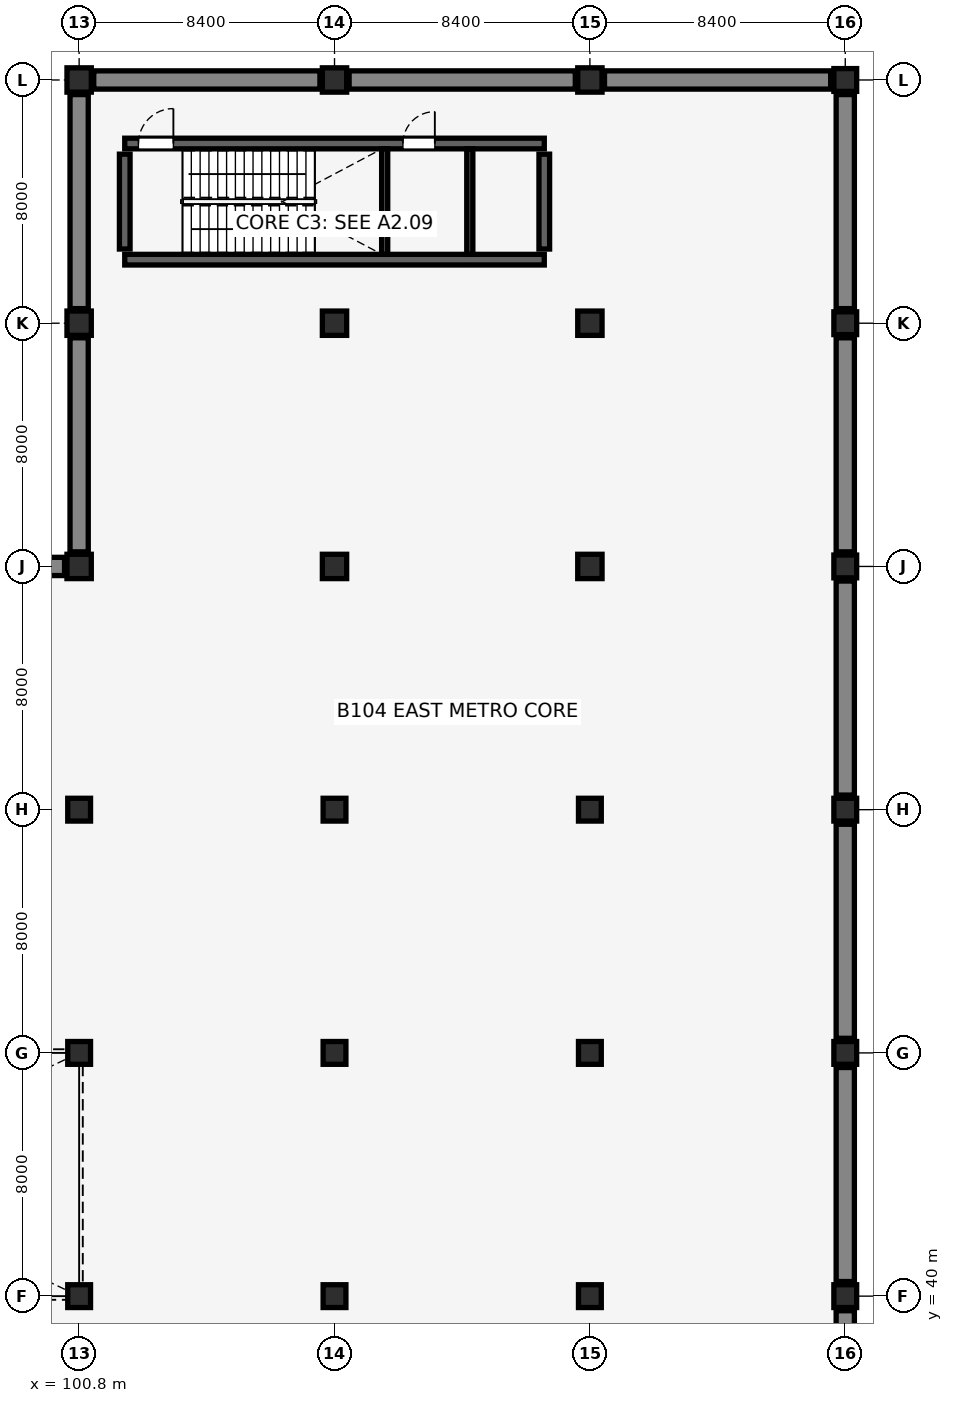
"""IFC4 building model, lengths in metres.
Left out: names, types, materials, properties, quantities, classifications, styles, units other than length and angle.
Written with IfcOpenShell. Run it as: python <this file> out.ifc"""

import sys

from ifc_helpers import new_model, si_unit, direction, frame, frame_2d, origin, origin_2d, place, context, subcontext, project, spatial, rectangle, extrude, element, fill, save


model = new_model("IFC4")
c1 = context("Model", 3, precision=1e-05, world=origin(), true_north=direction((0.0, 1.0)))
c2 = subcontext(c1, "Body", "Model", "MODEL_VIEW")
j1 = project(units=[si_unit("LENGTHUNIT", "METRE"), si_unit("PLANEANGLEUNIT", "RADIAN")], contexts=[c1])
p1 = place(None, origin())
s1 = spatial("IfcSite", under=j1, at=p1, CompositionType="ELEMENT")
p2 = place(p1, origin())
s2 = spatial("IfcBuilding", under=s1, at=p2, CompositionType="ELEMENT")
p3 = place(p2, frame((0.0, 0.0, -5.44)))
s3 = spatial("IfcBuildingStorey", under=s2, at=p3, CompositionType="ELEMENT", Elevation=-5.44)
p4 = place(p3, frame((92.88, 64.0, 0.0), z_axis=(0.0, 0.0, 1.0), x_axis=(1.0, 0.0, 0.0)))
e1 = element("IfcWall", 1, at=p4, inside=s3, PredefinedType="SOLIDWALL", context=c2, shape_type="SweptSolid", body=[
    extrude(rectangle(XDim=7.44, YDim=0.6, at=frame_2d((3.72, 0.0))), origin(), (0.0, 0.0, 1.0), 5.02),
])
for number, where, z_axis, x_axis in (
    (2, (100.8, 64.48, 0.0), (0.0, 0.0, 1.0), (0.0, 1.0, 0.0)),
    (3, (100.8, 72.48, 0.0), (0.0, 0.0, 1.0), (0.0, 1.0, 0.0)),
):
    element("IfcWall", number, at=place(p3, frame(where, z_axis=z_axis, x_axis=x_axis)), inside=s3, PredefinedType="SOLIDWALL", context=c2, shape_type="SweptSolid", body=[
        extrude(rectangle(XDim=7.04, YDim=0.6, at=frame_2d((3.52, 0.0))), origin(), (0.0, 0.0, 1.0), 5.02),
    ])
p5 = place(p3, frame((101.28, 80.0, 0.0), z_axis=(0.0, 0.0, 1.0), x_axis=(1.0, 0.0, 0.0)))
e4 = element("IfcWall", 4, at=p5, inside=s3, PredefinedType="SOLIDWALL", context=c2, shape_type="SweptSolid", body=[
    extrude(rectangle(XDim=7.44, YDim=0.6, at=frame_2d((3.72, 0.0))), origin(), (0.0, 0.0, 1.0), 5.02),
])
p6 = place(p3, frame((109.68, 80.0, 0.0), z_axis=(0.0, 0.0, 1.0), x_axis=(1.0, 0.0, 0.0)))
e5 = element("IfcWall", 5, at=p6, inside=s3, PredefinedType="SOLIDWALL", context=c2, shape_type="SweptSolid", body=[
    extrude(rectangle(XDim=7.44, YDim=0.6, at=frame_2d((3.72, 0.0))), origin(), (0.0, 0.0, 1.0), 5.02),
])
p7 = place(p3, frame((118.08, 80.0, 0.0), z_axis=(0.0, 0.0, 1.0), x_axis=(1.0, 0.0, 0.0)))
e6 = element("IfcWall", 6, at=p7, inside=s3, PredefinedType="SOLIDWALL", context=c2, shape_type="SweptSolid", body=[
    extrude(rectangle(XDim=7.44, YDim=0.6, at=frame_2d((3.72, 0.0))), origin(), (0.0, 0.0, 1.0), 5.02),
])
for number, where, z_axis, x_axis in (
    (7, (126.0, 64.48, 0.0), (0.0, 0.0, 1.0), (0.0, 1.0, 0.0)),
    (8, (126.0, 72.48, 0.0), (0.0, 0.0, 1.0), (0.0, 1.0, 0.0)),
    (9, (126.0, 32.48, 0.0), (0.0, 0.0, 1.0), (0.0, 1.0, 0.0)),
    (10, (126.0, 40.48, 0.0), (0.0, 0.0, 1.0), (0.0, 1.0, 0.0)),
    (11, (126.0, 48.48, 0.0), (0.0, 0.0, 1.0), (0.0, 1.0, 0.0)),
    (12, (126.0, 56.48, 0.0), (0.0, 0.0, 1.0), (0.0, 1.0, 0.0)),
):
    element("IfcWall", number, at=place(p3, frame(where, z_axis=z_axis, x_axis=x_axis)), inside=s3, PredefinedType="SOLIDWALL", context=c2, shape_type="SweptSolid", body=[
        extrude(rectangle(XDim=7.04, YDim=0.6, at=frame_2d((3.52, 0.0))), origin(), (0.0, 0.0, 1.0), 5.02),
    ])
p8 = place(p3, frame((102.3, 74.09, 0.0), z_axis=(0.0, 0.0, 1.0), x_axis=(1.0, 0.0, 0.0)))
e13 = element("IfcWall", 13, at=p8, inside=s3, PredefinedType="SHEAR", context=c2, shape_type="SweptSolid", body=[
    extrude(rectangle(XDim=13.8, YDim=0.35, at=frame_2d((6.9, 0.0))), origin(), (0.0, 0.0, 1.0), 5.02),
])
p9 = place(p3, frame((102.3, 77.91, 0.0), z_axis=(0.0, 0.0, 1.0), x_axis=(1.0, 0.0, 0.0)))
e14 = element("IfcWall", 14, at=p9, inside=s3, PredefinedType="SHEAR", context=c2, shape_type="SweptSolid", body=[
    extrude(rectangle(XDim=13.8, YDim=0.35, at=frame_2d((6.9, 0.0))), origin(), (0.0, 0.0, 1.0), 5.02),
])
p10 = place(p9, frame((0.45, 0.0, 0.0), z_axis=(0.0, 0.0, 1.0), x_axis=(1.0, 0.0, 0.0)))
e15 = element("IfcOpeningElement", 15, at=p10, cuts=e14, PredefinedType="OPENING", context=c2, shape_type="SweptSolid", body=[
    extrude(rectangle(XDim=1.15, YDim=2.15, at=frame_2d((0.575, 1.075))), frame((0.0, 0.185, 0.0), z_axis=(0.0, -1.0, 0.0), x_axis=(1.0, 0.0, 0.0)), (0.0, 0.0, 1.0), 0.37),
])
p11 = place(p9, frame((9.15, 0.0, 0.0), z_axis=(0.0, 0.0, 1.0), x_axis=(1.0, 0.0, 0.0)))
e16 = element("IfcOpeningElement", 16, at=p11, cuts=e14, PredefinedType="OPENING", context=c2, shape_type="SweptSolid", body=[
    extrude(rectangle(XDim=1.05, YDim=2.15, at=frame_2d((0.525, 1.075))), frame((0.0, 0.185, 0.0), z_axis=(0.0, -1.0, 0.0), x_axis=(1.0, 0.0, 0.0)), (0.0, 0.0, 1.0), 0.37),
])
for number, where, z_axis, x_axis in (
    (17, (102.3, 74.44, 0.0), (0.0, 0.0, 1.0), (0.0, 1.0, 0.0)),
    (18, (116.1, 74.44, 0.0), (0.0, 0.0, 1.0), (0.0, 1.0, 0.0)),
):
    element("IfcWall", number, at=place(p3, frame(where, z_axis=z_axis, x_axis=x_axis)), inside=s3, PredefinedType="SHEAR", context=c2, shape_type="SweptSolid", body=[
        extrude(rectangle(XDim=3.12, YDim=0.35, at=frame_2d((1.56, 0.0))), origin(), (0.0, 0.0, 1.0), 5.02),
    ])
for number, where, z_axis, x_axis in (
    (19, (100.8, 40.0, 0.0), (0.0, 0.0, 1.0), (1.0, 0.0, 0.0)),
    (20, (100.8, 48.0, 0.0), (0.0, 0.0, 1.0), (1.0, 0.0, 0.0)),
    (21, (100.8, 56.0, 0.0), (0.0, 0.0, 1.0), (1.0, 0.0, 0.0)),
):
    element("IfcColumn", number, at=place(p3, frame(where, z_axis=z_axis, x_axis=x_axis)), inside=s3, PredefinedType="COLUMN", context=c2, shape_type="SweptSolid", body=[
        extrude(rectangle(XDim=0.75, YDim=0.75, at=origin_2d()), origin(), (0.0, 0.0, 1.0), 5.02),
    ])
for number, where, z_axis, x_axis in (
    (22, (100.8, 64.0, 0.0), (0.0, 0.0, 1.0), (1.0, 0.0, 0.0)),
    (23, (100.8, 72.0, 0.0), (0.0, 0.0, 1.0), (1.0, 0.0, 0.0)),
    (24, (100.8, 80.0, 0.0), (0.0, 0.0, 1.0), (1.0, 0.0, 0.0)),
):
    element("IfcColumn", number, at=place(p3, frame(where, z_axis=z_axis, x_axis=x_axis)), inside=s3, PredefinedType="COLUMN", context=c2, shape_type="SweptSolid", body=[
        extrude(rectangle(XDim=0.8, YDim=0.8, at=origin_2d()), origin(), (0.0, 0.0, 1.0), 5.02),
    ])
for number, where, z_axis, x_axis in (
    (25, (109.2, 40.0, 0.0), (0.0, 0.0, 1.0), (1.0, 0.0, 0.0)),
    (26, (109.2, 48.0, 0.0), (0.0, 0.0, 1.0), (1.0, 0.0, 0.0)),
    (27, (109.2, 56.0, 0.0), (0.0, 0.0, 1.0), (1.0, 0.0, 0.0)),
):
    element("IfcColumn", number, at=place(p3, frame(where, z_axis=z_axis, x_axis=x_axis)), inside=s3, PredefinedType="COLUMN", context=c2, shape_type="SweptSolid", body=[
        extrude(rectangle(XDim=0.75, YDim=0.75, at=origin_2d()), origin(), (0.0, 0.0, 1.0), 5.02),
    ])
for number, where, z_axis, x_axis in (
    (28, (109.2, 64.0, 0.0), (0.0, 0.0, 1.0), (1.0, 0.0, 0.0)),
    (29, (109.2, 72.0, 0.0), (0.0, 0.0, 1.0), (1.0, 0.0, 0.0)),
    (30, (109.2, 80.0, 0.0), (0.0, 0.0, 1.0), (1.0, 0.0, 0.0)),
):
    element("IfcColumn", number, at=place(p3, frame(where, z_axis=z_axis, x_axis=x_axis)), inside=s3, PredefinedType="COLUMN", context=c2, shape_type="SweptSolid", body=[
        extrude(rectangle(XDim=0.8, YDim=0.8, at=origin_2d()), origin(), (0.0, 0.0, 1.0), 5.02),
    ])
for number, where, z_axis, x_axis in (
    (31, (117.6, 40.0, 0.0), (0.0, 0.0, 1.0), (1.0, 0.0, 0.0)),
    (32, (117.6, 48.0, 0.0), (0.0, 0.0, 1.0), (1.0, 0.0, 0.0)),
    (33, (117.6, 56.0, 0.0), (0.0, 0.0, 1.0), (1.0, 0.0, 0.0)),
):
    element("IfcColumn", number, at=place(p3, frame(where, z_axis=z_axis, x_axis=x_axis)), inside=s3, PredefinedType="COLUMN", context=c2, shape_type="SweptSolid", body=[
        extrude(rectangle(XDim=0.75, YDim=0.75, at=origin_2d()), origin(), (0.0, 0.0, 1.0), 5.02),
    ])
for number, where, z_axis, x_axis in (
    (34, (117.6, 64.0, 0.0), (0.0, 0.0, 1.0), (1.0, 0.0, 0.0)),
    (35, (117.6, 72.0, 0.0), (0.0, 0.0, 1.0), (1.0, 0.0, 0.0)),
    (36, (117.6, 80.0, 0.0), (0.0, 0.0, 1.0), (1.0, 0.0, 0.0)),
):
    element("IfcColumn", number, at=place(p3, frame(where, z_axis=z_axis, x_axis=x_axis)), inside=s3, PredefinedType="COLUMN", context=c2, shape_type="SweptSolid", body=[
        extrude(rectangle(XDim=0.8, YDim=0.8, at=origin_2d()), origin(), (0.0, 0.0, 1.0), 5.02),
    ])
for number, where, z_axis, x_axis in (
    (37, (126.0, 40.0, 0.0), (0.0, 0.0, 1.0), (1.0, 0.0, 0.0)),
    (38, (126.0, 48.0, 0.0), (0.0, 0.0, 1.0), (1.0, 0.0, 0.0)),
    (39, (126.0, 56.0, 0.0), (0.0, 0.0, 1.0), (1.0, 0.0, 0.0)),
    (40, (126.0, 64.0, 0.0), (0.0, 0.0, 1.0), (1.0, 0.0, 0.0)),
    (41, (126.0, 72.0, 0.0), (0.0, 0.0, 1.0), (1.0, 0.0, 0.0)),
    (42, (126.0, 80.0, 0.0), (0.0, 0.0, 1.0), (1.0, 0.0, 0.0)),
):
    element("IfcColumn", number, at=place(p3, frame(where, z_axis=z_axis, x_axis=x_axis)), inside=s3, PredefinedType="COLUMN", context=c2, shape_type="SweptSolid", body=[
        extrude(rectangle(XDim=0.75, YDim=0.75, at=origin_2d()), origin(), (0.0, 0.0, 1.0), 5.02),
    ])
for number, where, z_axis, x_axis in (
    (43, (110.85, 74.265, 0.0), (0.0, 0.0, 1.0), (0.0, 1.0, 0.0)),
    (44, (113.65, 74.265, 0.0), (0.0, 0.0, 1.0), (0.0, 1.0, 0.0)),
):
    element("IfcWall", number, at=place(p3, frame(where, z_axis=z_axis, x_axis=x_axis)), inside=s3, PredefinedType="SHEAR", context=c2, shape_type="SweptSolid", body=[
        extrude(rectangle(XDim=3.47, YDim=0.2, at=frame_2d((1.735, 0.0))), origin(), (0.0, 0.0, 1.0), 5.02),
    ])
p12 = place(p10, origin())
e45 = element("IfcDoor", 45, at=p12, inside=s3, OperationType="SINGLE_SWING_RIGHT", PredefinedType="DOOR", context=c2, shape_type="SweptSolid", body=[
    extrude(rectangle(XDim=1.15, YDim=2.15, at=frame_2d((0.575, 1.075))), frame((0.0, 0.025, 0.0), z_axis=(0.0, -1.0, 0.0), x_axis=(1.0, 0.0, 0.0)), (0.0, 0.0, 1.0), 0.05),
])
fill(e15, e45)
p13 = place(p11, origin())
e46 = element("IfcDoor", 46, at=p13, inside=s3, OperationType="SINGLE_SWING_RIGHT", PredefinedType="DOOR", context=c2, shape_type="SweptSolid", body=[
    extrude(rectangle(XDim=1.05, YDim=2.15, at=frame_2d((0.525, 1.075))), frame((0.0, 0.025, 0.0), z_axis=(0.0, -1.0, 0.0), x_axis=(1.0, 0.0, 0.0)), (0.0, 0.0, 1.0), 0.05),
])
fill(e16, e46)
save(model, sys.argv[1])
